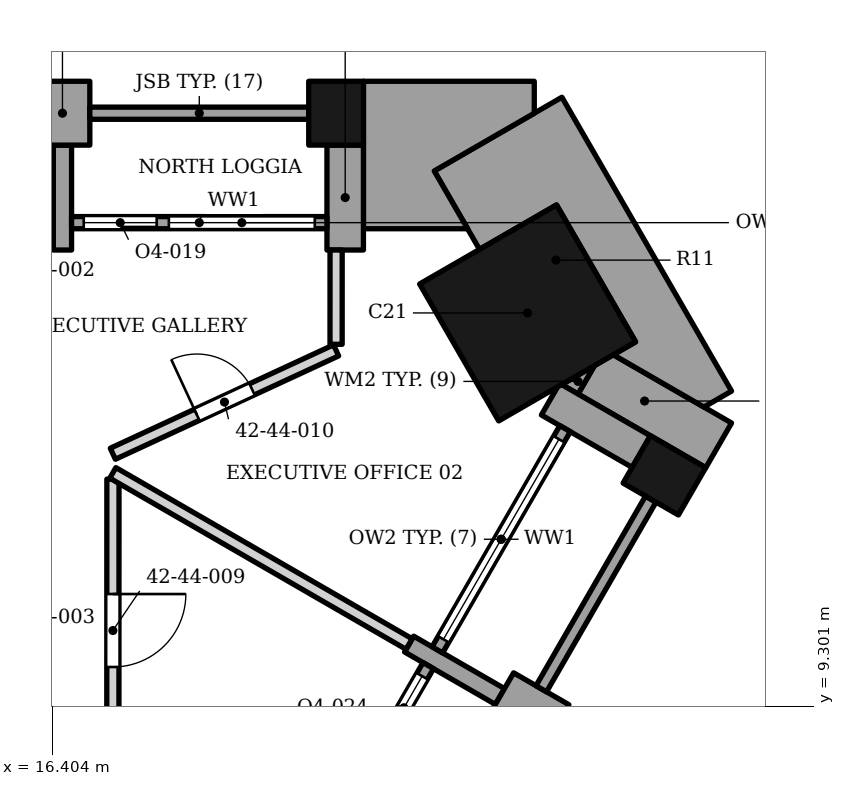
"""IFC4 building model, lengths in metres.
Left out: names, types, materials, properties, quantities, classifications, styles, units other than length and angle.
Written with IfcOpenShell. Run it as: python <this file> out.ifc"""

import sys

from ifc_helpers import new_model, si_unit, direction, frame, frame_2d, origin, origin_2d, place, context, subcontext, project, spatial, polyline, rectangle, outline, extrude, element, fill, save


model = new_model("IFC4")
c1 = context("Model", 3, precision=1e-05, world=origin(), true_north=direction((0.0, 1.0)))
c2 = subcontext(c1, "Body", "Model", "MODEL_VIEW")
j1 = project(units=[si_unit("LENGTHUNIT", "METRE"), si_unit("PLANEANGLEUNIT", "RADIAN")], contexts=[c1])
p1 = place(None, origin())
s1 = spatial("IfcSite", under=j1, at=p1, CompositionType="ELEMENT")
p2 = place(p1, origin())
s2 = spatial("IfcBuilding", under=s1, at=p2, CompositionType="ELEMENT")
p3 = place(p2, frame((0.0, 0.0, 179.7)))
s3 = spatial("IfcBuildingStorey", under=s2, at=p3, CompositionType="ELEMENT", Elevation=179.7)
p4 = place(p3, frame((24.222, 15.768, 0.0), z_axis=(0.0, 0.0, 1.0), x_axis=(-0.866025421238, -0.49999996977, 0.0)))
e1 = element("IfcColumn", 1, at=p4, inside=s3, PredefinedType="COLUMN", context=c2, shape_type="SweptSolid", body=[
    extrude(rectangle(XDim=2.6, YDim=2.6, at=origin_2d()), origin(), (0.0, 0.0, 1.0), 3.9),
])
for number, where, z_axis, x_axis in (
    (2, (26.472, 13.097, 0.0), (0.0, 0.0, 1.0), (0.5, 0.866, 0.0)),
    (3, (21.072, 19.053, 0.0), (0.0, 0.0, 1.0), (-1.0, 0.0, 0.0)),
):
    element("IfcColumn", number, at=place(p3, frame(where, z_axis=z_axis, x_axis=x_axis)), inside=s3, PredefinedType="COLUMN", context=c2, shape_type="SweptSolid", body=[
        extrude(rectangle(XDim=0.9, YDim=1.05, at=origin_2d()), origin(), (0.0, 0.0, 1.0), 3.9),
    ])
p5 = place(p3, frame((24.676, 8.935, 0.0), z_axis=(0.0, 0.0, 1.0), x_axis=(-0.866030680601, 0.499990860175, 0.0)))
e4 = element("IfcWall", 4, at=p5, inside=s3, PredefinedType="SOLIDWALL", context=c2, shape_type="SweptSolid", body=[
    extrude(rectangle(XDim=1.05, YDim=0.9, at=frame_2d((0.525, 0.0))), origin(), (0.0, 0.0, 1.0), 3.0),
])
p6 = place(p3, frame((23.767, 9.46, 0.0), z_axis=(0.0, 0.0, 1.0), x_axis=(-0.866013532718, 0.500020560727, 0.0)))
e5 = element("IfcWall", 5, at=p6, inside=s3, PredefinedType="SOLIDWALL", context=c2, shape_type="SweptSolid", body=[
    extrude(rectangle(XDim=1.725, YDim=0.3, at=frame_2d((0.863, 0.0))), origin(), (0.0, 0.0, 1.0), 3.0),
])
p7 = place(p3, frame((26.091, 13.488, 0.0), z_axis=(0.0, 0.0, 1.0), x_axis=(-0.866029956157, 0.499992114976, 0.0)))
e6 = element("IfcWall", 6, at=p7, inside=s3, PredefinedType="SOLIDWALL", context=c2, shape_type="SweptSolid", body=[
    extrude(rectangle(XDim=1.724, YDim=0.6, at=frame_2d((0.862, 0.0))), origin(), (0.0, 0.0, 1.0), 3.0),
])
p8 = place(p3, frame((20.488, 6.33, 0.0), z_axis=(0.0, 0.0, 1.0), x_axis=(0.500002543286, 0.866023935413, 0.0)))
e7 = element("IfcWall", 7, at=p8, inside=s3, PredefinedType="ELEMENTEDWALL", context=c2, shape_type="SweptSolid", body=[
    extrude(rectangle(XDim=4.2, YDim=0.2, at=frame_2d((2.1, 0.0))), origin(), (0.0, 0.0, 1.0), 3.0),
])
p9 = place(p8, frame((0.2, 0.0, 0.45)))
e8 = element("IfcOpeningElement", 8, at=p9, cuts=e7, PredefinedType="OPENING", context=c2, shape_type="SweptSolid", body=[
    extrude(rectangle(XDim=2.4, YDim=2.25, at=frame_2d((1.2, 1.125))), frame((0.0, 0.11, 0.0), z_axis=(0.0, -1.0, 0.0), x_axis=(1.0, 0.0, 0.0)), (0.0, 0.0, 1.0), 0.22),
])
p10 = place(p8, frame((2.8, 0.0, 0.0)))
e9 = element("IfcOpeningElement", 9, at=p10, cuts=e7, PredefinedType="OPENING", context=c2, shape_type="SweptSolid", body=[
    extrude(rectangle(XDim=1.2, YDim=2.7, at=frame_2d((0.6, 1.35))), frame((0.0, 0.11, 0.0), z_axis=(0.0, -1.0, 0.0), x_axis=(1.0, 0.0, 0.0)), (0.0, 0.0, 1.0), 0.22),
])
p11 = place(p3, frame((24.447, 9.587, 0.0), z_axis=(0.0, 0.0, 1.0), x_axis=(0.499931829785, 0.866064758299, 0.0)))
e10 = element("IfcWall", 10, at=p11, inside=s3, PredefinedType="SOLIDWALL", context=c2, shape_type="SweptSolid", body=[
    extrude(rectangle(XDim=3.6, YDim=0.2, at=frame_2d((1.8, 0.0))), origin(), (0.0, 0.0, 1.0), 3.0),
])
p12 = place(p3, frame((22.738, 10.228, 0.0), z_axis=(0.0, 0.0, 1.0), x_axis=(0.500027713859, 0.866009402589, 0.0)))
e11 = element("IfcWall", 11, at=p12, inside=s3, PredefinedType="ELEMENTEDWALL", context=c2, shape_type="SweptSolid", body=[
    extrude(rectangle(XDim=4.2, YDim=0.2, at=frame_2d((2.1, 0.0))), origin(), (0.0, 0.0, 1.0), 3.0),
])
p13 = place(p12, frame((0.2, 0.0, 0.45)))
e12 = element("IfcOpeningElement", 12, at=p13, cuts=e11, PredefinedType="OPENING", context=c2, shape_type="SweptSolid", body=[
    extrude(rectangle(XDim=3.8, YDim=2.25, at=frame_2d((1.9, 1.125))), frame((0.0, 0.11, 0.0), z_axis=(0.0, -1.0, 0.0), x_axis=(1.0, 0.0, 0.0)), (0.0, 0.0, 1.0), 0.22),
])
p14 = place(p3, origin())
e13 = element("IfcWall", 13, at=p14, inside=s3, PredefinedType="SOLIDWALL", context=c2, shape_type="SweptSolid", body=[
    extrude(outline(polyline([(21.522, 16.802), (21.522, 18.528), (20.922, 18.528), (20.922, 16.802), (21.522, 16.802)])), origin(), (0.0, 0.0, 1.0), 3.0),
])
p15 = place(p3, origin())
e14 = element("IfcWall", 14, at=p15, inside=s3, PredefinedType="SOLIDWALL", context=c2, shape_type="SweptSolid", body=[
    extrude(outline(polyline([(17.022, 19.578), (16.122, 19.578), (16.122, 18.528), (17.022, 18.528), (17.022, 19.578)])), origin(), (0.0, 0.0, 1.0), 3.0),
])
p16 = place(p3, origin())
e15 = element("IfcWall", 15, at=p16, inside=s3, PredefinedType="SOLIDWALL", context=c2, shape_type="SweptSolid", body=[
    extrude(outline(polyline([(16.422, 18.528), (16.422, 16.802), (16.722, 16.802), (16.722, 18.528), (16.422, 18.528)])), origin(), (0.0, 0.0, 1.0), 3.0),
])
p17 = place(p3, frame((20.622, 19.052, 0.0), z_axis=(0.0, 0.0, 1.0), x_axis=(-1.0, 0.0, 0.0)))
e16 = element("IfcWall", 16, at=p17, inside=s3, PredefinedType="SOLIDWALL", context=c2, shape_type="SweptSolid", body=[
    extrude(rectangle(XDim=3.6, YDim=0.2, at=frame_2d((1.8, 0.0))), origin(), (0.0, 0.0, 1.0), 3.0),
])
p18 = place(p3, frame((20.922, 17.252, 0.0), z_axis=(0.0, 0.0, 1.0), x_axis=(-1.0, 0.0, 0.0)))
e17 = element("IfcWall", 17, at=p18, inside=s3, PredefinedType="ELEMENTEDWALL", context=c2, shape_type="SweptSolid", body=[
    extrude(rectangle(XDim=4.2, YDim=0.2, at=frame_2d((2.1, 0.0))), origin(), (0.0, 0.0, 1.0), 3.0),
])
p19 = place(p18, frame((0.2, 0.0, 0.45)))
e18 = element("IfcOpeningElement", 18, at=p19, cuts=e17, PredefinedType="OPENING", context=c2, shape_type="SweptSolid", body=[
    extrude(rectangle(XDim=2.4, YDim=2.25, at=frame_2d((1.2, 1.125))), frame((0.0, 0.11, 0.0), z_axis=(0.0, -1.0, 0.0), x_axis=(1.0, 0.0, 0.0)), (0.0, 0.0, 1.0), 0.22),
])
p20 = place(p18, frame((2.8, 0.0, 0.0)))
e19 = element("IfcOpeningElement", 19, at=p20, cuts=e17, PredefinedType="OPENING", context=c2, shape_type="SweptSolid", body=[
    extrude(rectangle(XDim=1.2, YDim=2.7, at=frame_2d((0.6, 1.35))), frame((0.0, 0.11, 0.0), z_axis=(0.0, -1.0, 0.0), x_axis=(1.0, 0.0, 0.0)), (0.0, 0.0, 1.0), 0.22),
])
p21 = place(p3, origin())
e20 = element("IfcWall", 20, at=p21, inside=s3, PredefinedType="SOLIDWALL", context=c2, shape_type="SweptSolid", body=[
    extrude(outline(polyline([(25.051, 14.434), (27.151, 13.222), (27.576, 13.958), (25.631, 15.081), (25.321, 14.901), (25.051, 14.434)])), origin(), (0.0, 0.0, 1.0), 3.0),
])
p22 = place(p3, origin())
e21 = element("IfcWall", 21, at=p22, inside=s3, PredefinedType="SOLIDWALL", context=c2, shape_type="SweptSolid", body=[
    extrude(outline(polyline([(25.051, 14.434), (25.321, 14.901), (24.782, 14.59), (25.051, 14.434)])), origin(), (0.0, 0.0, 1.0), 3.0),
])
p23 = place(p3, origin())
e22 = element("IfcWall", 22, at=p23, inside=s3, PredefinedType="SOLIDWALL", context=c2, shape_type="SweptSolid", body=[
    extrude(outline(polyline([(23.431, 16.812), (24.698, 17.544), (25.998, 15.292), (25.631, 15.081), (27.122, 14.22), (27.576, 14.483), (24.786, 19.315), (22.686, 18.103), (23.431, 16.812)])), origin(), (0.0, 0.0, 1.0), 3.0),
])
p24 = place(p3, origin())
e23 = element("IfcWall", 23, at=p24, inside=s3, PredefinedType="SOLIDWALL", context=c2, shape_type="SweptSolid", body=[
    extrude(outline(polyline([(21.522, 18.528), (21.522, 17.153), (23.235, 17.153), (22.686, 18.103), (24.332, 19.052), (24.332, 19.578), (21.522, 19.578), (21.522, 18.528), (21.522, 18.528)])), origin(), (0.0, 0.0, 1.0), 3.0),
])
p25 = place(p3, frame((17.4, 7.953, 0.0), z_axis=(0.0, 0.0, 1.0), x_axis=(0.000336263612, 0.999999943463, 0.0)))
e24 = element("IfcWall", 24, at=p25, inside=s3, PredefinedType="PARTITIONING", context=c2, shape_type="SweptSolid", body=[
    extrude(rectangle(XDim=5.082, YDim=0.2, at=frame_2d((2.541, 0.0))), origin(), (0.0, 0.0, 1.0), 3.73),
])
p26 = place(p25, frame((1.992, 0.0, 0.0)))
e25 = element("IfcOpeningElement", 25, at=p26, cuts=e24, PredefinedType="OPENING", context=c2, shape_type="SweptSolid", body=[
    extrude(rectangle(XDim=1.2, YDim=2.4, at=frame_2d((0.6, 1.2))), frame((0.0, 0.11, 0.0), z_axis=(0.0, -1.0, 0.0), x_axis=(1.0, 0.0, 0.0)), (0.0, 0.0, 1.0), 0.22),
])
p27 = place(p3, frame((17.401, 13.138, 0.0), z_axis=(0.0, 0.0, 1.0), x_axis=(0.865889294905, -0.500235673427, 0.0)))
e26 = element("IfcWall", 26, at=p27, inside=s3, PredefinedType="PARTITIONING", context=c2, shape_type="SweptSolid", body=[
    extrude(rectangle(XDim=5.627, YDim=0.2, at=frame_2d((2.813, 0.0))), origin(), (0.0, 0.0, 1.0), 3.73),
])
p28 = place(p3, frame((17.4, 13.452, 0.0), z_axis=(0.0, 0.0, 1.0), x_axis=(0.907455404493, 0.420148412892, 0.0)))
e27 = element("IfcWall", 27, at=p28, inside=s3, PredefinedType="PARTITIONING", context=c2, shape_type="SweptSolid", body=[
    extrude(rectangle(XDim=4.046, YDim=0.2, at=frame_2d((2.023, 0.0))), origin(), (0.0, 0.0, 1.0), 3.73),
])
p29 = place(p28, frame((1.523, 0.0, 0.0)))
e28 = element("IfcOpeningElement", 28, at=p29, cuts=e27, PredefinedType="OPENING", context=c2, shape_type="SweptSolid", body=[
    extrude(rectangle(XDim=1.0, YDim=2.4, at=frame_2d((0.5, 1.2))), frame((0.0, 0.11, 0.0), z_axis=(0.0, -1.0, 0.0), x_axis=(1.0, 0.0, 0.0)), (0.0, 0.0, 1.0), 0.22),
])
p30 = place(p3, frame((21.072, 15.252, 0.0), z_axis=(0.0, 0.0, 1.0), x_axis=(0.000314960614, 0.9999999504, 0.0)))
e29 = element("IfcWall", 29, at=p30, inside=s3, PredefinedType="PARTITIONING", context=c2, shape_type="SweptSolid", body=[
    extrude(rectangle(XDim=1.55, YDim=0.2, at=frame_2d((0.775, 0.0))), origin(), (0.0, 0.0, 1.0), 3.73),
])
p31 = place(p10, origin())
e30 = element("IfcDoor", 30, at=p31, inside=s3, OperationType="SINGLE_SWING_LEFT", PredefinedType="DOOR", context=c2, shape_type="SweptSolid", body=[
    extrude(rectangle(XDim=1.2, YDim=2.7, at=frame_2d((0.6, 1.35))), frame((0.0, 0.025, 0.0), z_axis=(0.0, -1.0, 0.0), x_axis=(1.0, 0.0, 0.0)), (0.0, 0.0, 1.0), 0.05),
])
fill(e9, e30)
p32 = place(p13, origin())
e31 = element("IfcWindow", 31, at=p32, inside=s3, PartitioningType="SINGLE_PANEL", PredefinedType="WINDOW", context=c2, shape_type="SweptSolid", body=[
    extrude(rectangle(XDim=3.8, YDim=2.25, at=frame_2d((1.9, 1.125))), frame((0.0, 0.03, 0.0), z_axis=(0.0, -1.0, 0.0), x_axis=(1.0, 0.0, 0.0)), (0.0, 0.0, 1.0), 0.06),
])
fill(e12, e31)
p33 = place(p19, origin())
e32 = element("IfcWindow", 32, at=p33, inside=s3, PartitioningType="SINGLE_PANEL", PredefinedType="WINDOW", context=c2, shape_type="SweptSolid", body=[
    extrude(rectangle(XDim=2.4, YDim=2.25, at=frame_2d((1.2, 1.125))), frame((0.0, 0.03, 0.0), z_axis=(0.0, -1.0, 0.0), x_axis=(1.0, 0.0, 0.0)), (0.0, 0.0, 1.0), 0.06),
])
fill(e18, e32)
p34 = place(p20, origin())
e33 = element("IfcDoor", 33, at=p34, inside=s3, OperationType="SINGLE_SWING_LEFT", PredefinedType="DOOR", context=c2, shape_type="SweptSolid", body=[
    extrude(rectangle(XDim=1.2, YDim=2.7, at=frame_2d((0.6, 1.35))), frame((0.0, 0.025, 0.0), z_axis=(0.0, -1.0, 0.0), x_axis=(1.0, 0.0, 0.0)), (0.0, 0.0, 1.0), 0.05),
])
fill(e19, e33)
p35 = place(p26, origin())
e34 = element("IfcDoor", 34, at=p35, inside=s3, OperationType="SINGLE_SWING_RIGHT", PredefinedType="DOOR", context=c2, shape_type="SweptSolid", body=[
    extrude(rectangle(XDim=1.2, YDim=2.4, at=frame_2d((0.6, 1.2))), frame((0.0, 0.025, 0.0), z_axis=(0.0, -1.0, 0.0), x_axis=(1.0, 0.0, 0.0)), (0.0, 0.0, 1.0), 0.05),
])
fill(e25, e34)
p36 = place(p29, origin())
e35 = element("IfcDoor", 35, at=p36, inside=s3, OperationType="SINGLE_SWING_LEFT", PredefinedType="DOOR", context=c2, shape_type="SweptSolid", body=[
    extrude(rectangle(XDim=1.0, YDim=2.4, at=frame_2d((0.5, 1.2))), frame((0.0, 0.025, 0.0), z_axis=(0.0, -1.0, 0.0), x_axis=(1.0, 0.0, 0.0)), (0.0, 0.0, 1.0), 0.05),
])
fill(e28, e35)
save(model, sys.argv[1])
